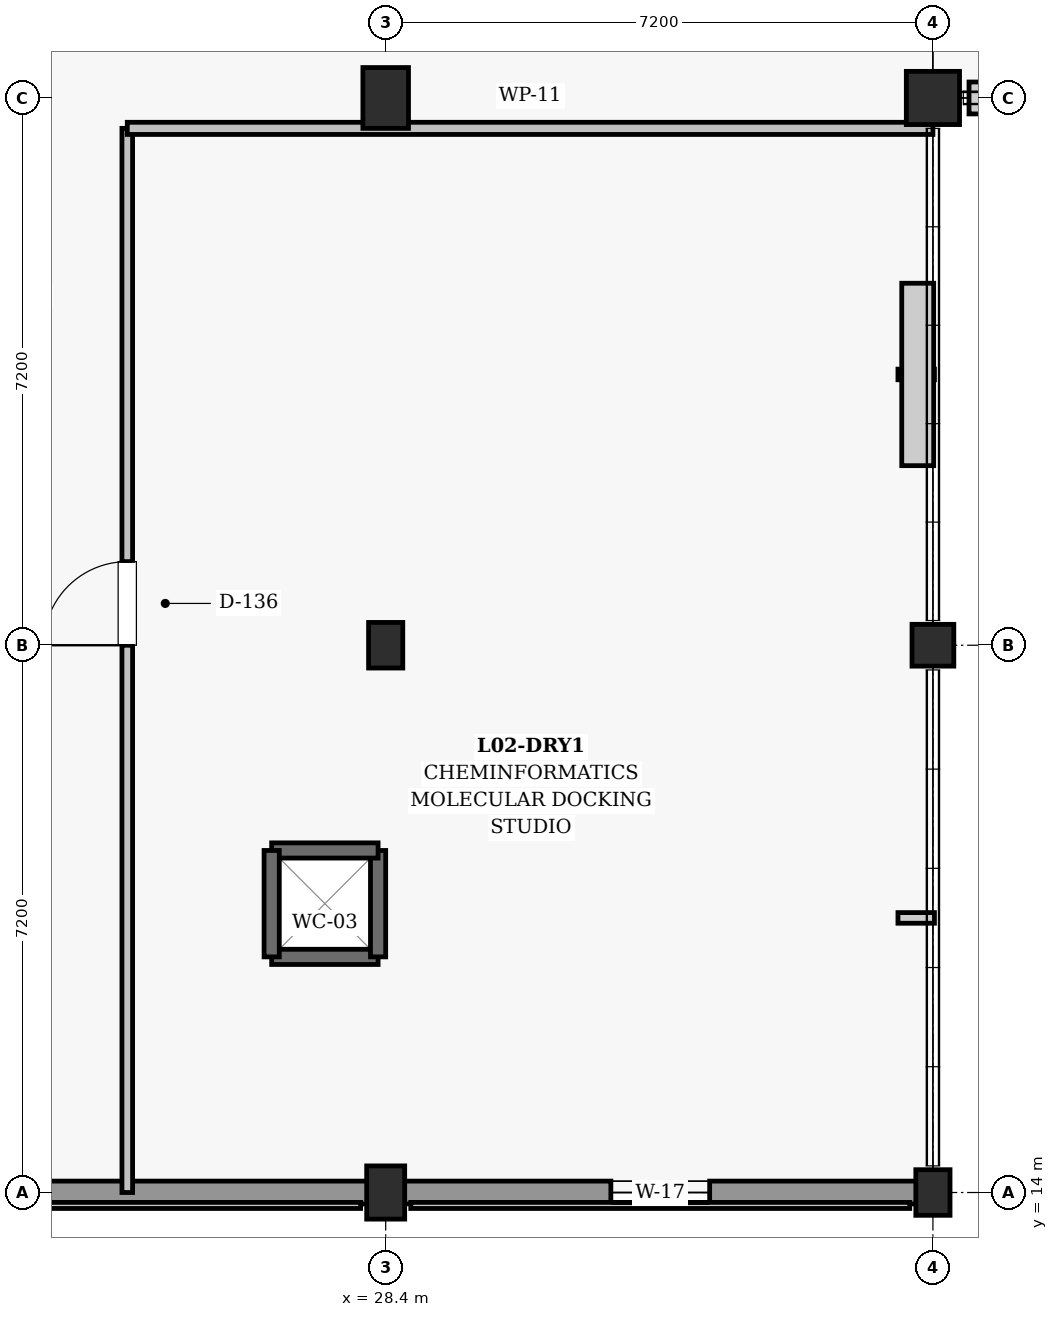
"""IFC4 building model, lengths in metres.
Left out: names, types, materials, properties, quantities, classifications, styles, units other than length and angle.
Written with IfcOpenShell. Run it as: python <this file> out.ifc"""

import sys

from ifc_helpers import new_model, si_unit, direction, frame, frame_2d, origin, origin_2d, place, context, subcontext, project, spatial, rectangle, extrude, element, fill, save


model = new_model("IFC4")
c1 = context("Model", 3, precision=1e-05, world=origin(), true_north=direction((0.0, 1.0)))
c2 = subcontext(c1, "Body", "Model", "MODEL_VIEW")
j1 = project(units=[si_unit("LENGTHUNIT", "METRE"), si_unit("PLANEANGLEUNIT", "RADIAN")], contexts=[c1])
p1 = place(None, origin())
s1 = spatial("IfcSite", under=j1, at=p1, CompositionType="ELEMENT")
p2 = place(p1, origin())
s2 = spatial("IfcBuilding", under=s1, at=p2, CompositionType="ELEMENT")
p3 = place(p2, frame((0.0, 0.0, 9.9)))
s3 = spatial("IfcBuildingStorey", under=s2, at=p3, CompositionType="ELEMENT", Elevation=9.9)
p4 = place(p3, frame((28.4, 14.0, 0.0), z_axis=(0.0, 0.0, 1.0), x_axis=(1.0, 0.0, 0.0)))
e1 = element("IfcColumn", 1, at=p4, inside=s3, PredefinedType="COLUMN", context=c2, shape_type="SweptSolid", body=[
    extrude(rectangle(XDim=0.5, YDim=0.7, at=origin_2d()), origin(), (0.0, 0.0, 1.0), 4.5),
])
p5 = place(p3, frame((28.4, 21.2, 0.0), z_axis=(0.0, 0.0, 1.0), x_axis=(1.0, 0.0, 0.0)))
e2 = element("IfcColumn", 2, at=p5, inside=s3, PredefinedType="COLUMN", context=c2, shape_type="SweptSolid", body=[
    extrude(rectangle(XDim=0.45, YDim=0.6, at=origin_2d()), origin(), (0.0, 0.0, 1.0), 4.5),
])
p6 = place(p3, frame((28.4, 28.4, 0.0), z_axis=(0.0, 0.0, 1.0), x_axis=(1.0, 0.0, 0.0)))
e3 = element("IfcColumn", 3, at=p6, inside=s3, PredefinedType="COLUMN", context=c2, shape_type="SweptSolid", body=[
    extrude(rectangle(XDim=0.6, YDim=0.8, at=origin_2d()), origin(), (0.0, 0.0, 1.0), 4.5),
])
p7 = place(p3, frame((35.6, 14.0, 0.0), z_axis=(0.0, 0.0, 1.0), x_axis=(1.0, 0.0, 0.0)))
e4 = element("IfcColumn", 4, at=p7, inside=s3, PredefinedType="COLUMN", context=c2, shape_type="SweptSolid", body=[
    extrude(rectangle(XDim=0.45, YDim=0.6, at=origin_2d()), origin(), (0.0, 0.0, 1.0), 4.5),
])
p8 = place(p3, frame((35.6, 21.2, 0.0), z_axis=(0.0, 0.0, 1.0), x_axis=(1.0, 0.0, 0.0)))
e5 = element("IfcColumn", 5, at=p8, inside=s3, PredefinedType="COLUMN", context=c2, shape_type="SweptSolid", body=[
    extrude(rectangle(XDim=0.55, YDim=0.55, at=origin_2d()), origin(), (0.0, 0.0, 1.0), 4.5),
])
p9 = place(p3, frame((35.6, 28.4, 0.0), z_axis=(0.0, 0.0, 1.0), x_axis=(1.0, 0.0, 0.0)))
e6 = element("IfcColumn", 6, at=p9, inside=s3, PredefinedType="COLUMN", context=c2, shape_type="SweptSolid", body=[
    extrude(rectangle(XDim=0.7, YDim=0.7, at=origin_2d()), origin(), (0.0, 0.0, 1.0), 4.5),
])
p10 = place(p3, frame((21.48, 14.0, 0.0), z_axis=(0.0, 0.0, 1.0), x_axis=(1.0, 0.0, 0.0)))
e7 = element("IfcWall", 7, at=p10, inside=s3, PredefinedType="SOLIDWALL", context=c2, shape_type="SweptSolid", body=[
    extrude(rectangle(XDim=6.69, YDim=0.3, at=frame_2d((3.345, 0.0))), origin(), (0.0, 0.0, 1.0), 3.475),
])
p11 = place(p3, frame((28.63, 14.0, 0.0), z_axis=(0.0, 0.0, 1.0), x_axis=(1.0, 0.0, 0.0)))
e8 = element("IfcWall", 8, at=p11, inside=s3, PredefinedType="SOLIDWALL", context=c2, shape_type="SweptSolid", body=[
    extrude(rectangle(XDim=6.765, YDim=0.3, at=frame_2d((3.383, 0.0))), origin(), (0.0, 0.0, 1.0), 3.575),
])
p12 = place(p11, frame((2.732, 0.0, 0.95)))
e9 = element("IfcOpeningElement", 9, at=p12, cuts=e8, PredefinedType="OPENING", context=c2, shape_type="SweptSolid", body=[
    extrude(rectangle(XDim=1.3, YDim=2.35, at=frame_2d((0.65, 1.175))), frame((0.0, 0.16, 0.0), z_axis=(0.0, -1.0, 0.0), x_axis=(1.0, 0.0, 0.0)), (0.0, 0.0, 1.0), 0.32),
])
p13 = place(p3, frame((26.9, 17.1, 0.0), z_axis=(0.0, 0.0, 1.0), x_axis=(1.0, 0.0, 0.0)))
e10 = element("IfcWall", 10, at=p13, inside=s3, PredefinedType="SHEAR", context=c2, shape_type="SweptSolid", body=[
    extrude(rectangle(XDim=1.4, YDim=0.2, at=frame_2d((0.7, 0.0))), origin(), (0.0, 0.0, 1.0), 4.16),
])
p14 = place(p3, frame((28.3, 17.1, 0.0), z_axis=(0.0, 0.0, 1.0), x_axis=(0.0, 1.0, 0.0)))
e11 = element("IfcWall", 11, at=p14, inside=s3, PredefinedType="SHEAR", context=c2, shape_type="SweptSolid", body=[
    extrude(rectangle(XDim=1.4, YDim=0.2, at=frame_2d((0.7, 0.0))), origin(), (0.0, 0.0, 1.0), 4.16),
])
p15 = place(p3, frame((28.3, 18.5, 0.0), z_axis=(0.0, 0.0, 1.0), x_axis=(-1.0, 0.0, 0.0)))
e12 = element("IfcWall", 12, at=p15, inside=s3, PredefinedType="SHEAR", context=c2, shape_type="SweptSolid", body=[
    extrude(rectangle(XDim=1.4, YDim=0.2, at=frame_2d((0.7, 0.0))), origin(), (0.0, 0.0, 1.0), 4.16),
])
p16 = place(p3, frame((26.9, 18.5, 0.0), z_axis=(0.0, 0.0, 1.0), x_axis=(0.0, -1.0, 0.0)))
e13 = element("IfcWall", 13, at=p16, inside=s3, PredefinedType="SHEAR", context=c2, shape_type="SweptSolid", body=[
    extrude(rectangle(XDim=1.4, YDim=0.2, at=frame_2d((0.7, 0.0))), origin(), (0.0, 0.0, 1.0), 4.16),
])
p17 = place(p3, frame((25.0, 14.0, 0.0), z_axis=(0.0, 0.0, 1.0), x_axis=(0.0, 1.0, 0.0)))
e14 = element("IfcWall", 14, at=p17, inside=s3, PredefinedType="PARTITIONING", context=c2, shape_type="SweptSolid", body=[
    extrude(rectangle(XDim=14.0, YDim=0.14, at=frame_2d((7.0, 0.0))), origin(), (0.0, 0.0, 1.0), 3.48),
])
p18 = place(p17, frame((7.2, 0.0, 0.0)))
e15 = element("IfcOpeningElement", 15, at=p18, cuts=e14, PredefinedType="OPENING", context=c2, shape_type="SweptSolid", body=[
    extrude(rectangle(XDim=1.1, YDim=2.15, at=frame_2d((0.55, 1.075))), frame((0.0, 0.08, 0.0), z_axis=(0.0, -1.0, 0.0), x_axis=(1.0, 0.0, 0.0)), (0.0, 0.0, 1.0), 0.16),
])
p19 = place(p3, frame((25.0, 28.0, 0.0), z_axis=(0.0, 0.0, 1.0), x_axis=(1.0, 0.0, 0.0)))
e16 = element("IfcWall", 16, at=p19, inside=s3, PredefinedType="PARTITIONING", context=c2, shape_type="SweptSolid", body=[
    extrude(rectangle(XDim=10.6, YDim=0.16, at=frame_2d((5.3, 0.0))), origin(), (0.0, 0.0, 1.0), 3.58),
])
p20 = place(p12, origin())
e17 = element("IfcWindow", 17, at=p20, inside=s3, PartitioningType="SINGLE_PANEL", PredefinedType="WINDOW", context=c2, shape_type="SweptSolid", body=[
    extrude(rectangle(XDim=1.3, YDim=2.35, at=frame_2d((0.65, 1.175))), frame((0.0, 0.03, 0.0), z_axis=(0.0, -1.0, 0.0), x_axis=(1.0, 0.0, 0.0)), (0.0, 0.0, 1.0), 0.06),
])
fill(e9, e17)
p21 = place(p18, origin())
e18 = element("IfcDoor", 18, at=p21, inside=s3, OperationType="SINGLE_SWING_LEFT", PredefinedType="DOOR", context=c2, shape_type="SweptSolid", body=[
    extrude(rectangle(XDim=1.1, YDim=2.15, at=frame_2d((0.55, 1.075))), frame((0.0, 0.025, 0.0), z_axis=(0.0, -1.0, 0.0), x_axis=(1.0, 0.0, 0.0)), (0.0, 0.0, 1.0), 0.05),
])
fill(e15, e18)
save(model, sys.argv[1])
